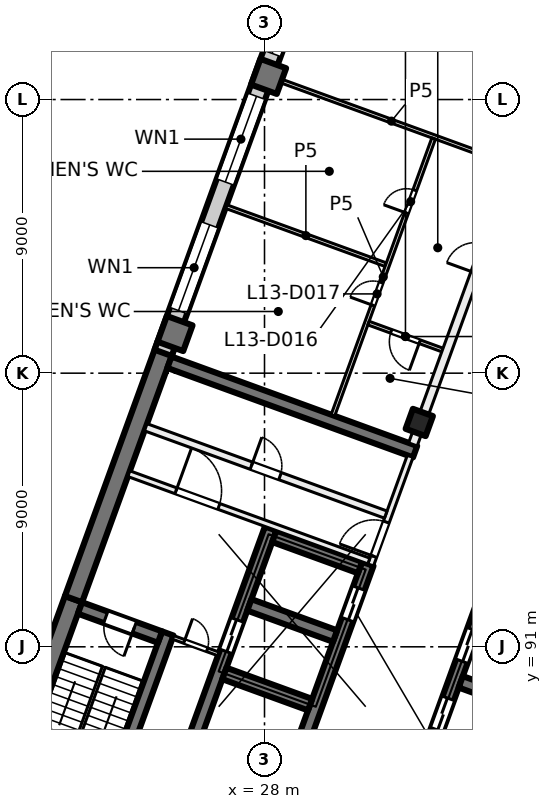
"""IFC4 building model, lengths in metres.
Left out: names, types, materials, properties, quantities, classifications, styles, units other than length and angle.
Written with IfcOpenShell. Run it as: python <this file> out.ifc"""

import sys

from ifc_helpers import new_model, si_unit, direction, frame, frame_2d, origin, origin_2d, place, context, subcontext, project, spatial, rectangle, extrude, element, fill, save


model = new_model("IFC4")
c1 = context("Model", 3, precision=1e-05, world=origin(), true_north=direction((0.0, 1.0)))
c2 = subcontext(c1, "Body", "Model", "MODEL_VIEW")
j1 = project(units=[si_unit("LENGTHUNIT", "METRE"), si_unit("PLANEANGLEUNIT", "RADIAN")], contexts=[c1])
p1 = place(None, origin())
s1 = spatial("IfcSite", under=j1, at=p1, CompositionType="ELEMENT")
p2 = place(p1, origin())
s2 = spatial("IfcBuilding", under=s1, at=p2, CompositionType="ELEMENT")
p3 = place(p2, frame((0.0, 0.0, 59.5)))
s3 = spatial("IfcBuildingStorey", under=s2, at=p3, CompositionType="ELEMENT", Elevation=59.5)
p4 = place(p3, frame((33.091, 98.379, 0.0), z_axis=(0.0, 0.0, 1.0), x_axis=(-0.342020143326, -0.939692620786, 0.0)))
e1 = element("IfcColumn", 1, at=p4, inside=s3, PredefinedType="COLUMN", context=c2, shape_type="SweptSolid", body=[
    extrude(rectangle(XDim=0.7, YDim=0.7, at=origin_2d()), origin(), (0.0, 0.0, 1.0), 4.0),
])
for number, where, z_axis, x_axis in (
    (2, (28.134, 109.76, 0.0), (0.0, 0.0, 1.0), (-0.342, -0.94, 0.0)),
    (3, (25.056, 101.303, 0.0), (0.0, 0.0, 1.0), (-0.342, -0.94, 0.0)),
):
    element("IfcColumn", number, at=place(p3, frame(where, z_axis=z_axis, x_axis=x_axis)), inside=s3, PredefinedType="COLUMN", context=c2, shape_type="SweptSolid", body=[
        extrude(rectangle(XDim=0.9, YDim=0.9, at=origin_2d()), origin(), (0.0, 0.0, 1.0), 4.0),
    ])
p5 = place(p3, frame((19.05, 85.239, 0.0), z_axis=(0.0, 0.0, 1.0), x_axis=(0.342016982193, 0.939693771338, 0.0)))
e4 = element("IfcWall", 4, at=p5, inside=s3, PredefinedType="SHEAR", context=c2, shape_type="SweptSolid", body=[
    extrude(rectangle(XDim=7.8, YDim=0.6, at=frame_2d((3.9, 0.0))), origin(), (0.0, 0.0, 1.0), 4.0),
])
p6 = place(p3, frame((21.717, 92.568, 0.0), z_axis=(0.0, 0.0, 1.0), x_axis=(0.342016162452, 0.939694069696, 0.0)))
e5 = element("IfcWall", 5, at=p6, inside=s3, PredefinedType="SHEAR", context=c2, shape_type="SweptSolid", body=[
    extrude(rectangle(XDim=8.9, YDim=0.6, at=frame_2d((4.45, 0.0))), origin(), (0.0, 0.0, 1.0), 4.0),
])
p7 = place(p3, frame((22.15, 84.11, 0.0), z_axis=(0.0, 0.0, 1.0), x_axis=(0.342016982193, 0.939693771338, 0.0)))
e6 = element("IfcWall", 6, at=p7, inside=s3, PredefinedType="SHEAR", context=c2, shape_type="SweptSolid", body=[
    extrude(rectangle(XDim=7.8, YDim=0.4, at=frame_2d((3.9, 0.0))), origin(), (0.0, 0.0, 1.0), 4.0),
])
p8 = place(p3, frame((24.562, 91.32, 0.0), z_axis=(0.0, 0.0, 1.0), x_axis=(-0.939717030584, 0.341953070509, 0.0)))
e7 = element("IfcWall", 7, at=p8, inside=s3, PredefinedType="SHEAR", context=c2, shape_type="SweptSolid", body=[
    extrude(rectangle(XDim=2.8, YDim=0.4, at=frame_2d((1.4, 0.0))), origin(), (0.0, 0.0, 1.0), 4.0),
])
p9 = place(p8, frame((0.9, 0.0, 0.0)))
e8 = element("IfcOpeningElement", 8, at=p9, cuts=e7, PredefinedType="OPENING", context=c2, shape_type="SweptSolid", body=[
    extrude(rectangle(XDim=1.0, YDim=2.1, at=frame_2d((0.5, 1.05))), frame((0.0, 0.21, 0.0), z_axis=(0.0, -1.0, 0.0), x_axis=(1.0, 0.0, 0.0)), (0.0, 0.0, 1.0), 0.42),
])
p10 = place(p3, frame((30.984, 80.895, 0.0), z_axis=(0.0, 0.0, 1.0), x_axis=(0.342021021735, 0.939692301071, 0.0)))
e9 = element("IfcWall", 9, at=p10, inside=s3, PredefinedType="SHEAR", context=c2, shape_type="SweptSolid", body=[
    extrude(rectangle(XDim=12.2, YDim=0.4, at=frame_2d((6.1, 0.0))), origin(), (0.0, 0.0, 1.0), 4.0),
])
p11 = place(p10, frame((5.45, 0.0, 0.0)))
e10 = element("IfcOpeningElement", 10, at=p11, cuts=e9, PredefinedType="OPENING", context=c2, shape_type="SweptSolid", body=[
    extrude(rectangle(XDim=1.1, YDim=2.1, at=frame_2d((0.55, 1.05))), frame((0.0, 0.21, 0.0), z_axis=(0.0, -1.0, 0.0), x_axis=(1.0, 0.0, 0.0)), (0.0, 0.0, 1.0), 0.42),
])
p12 = place(p10, frame((7.85, 0.0, 0.0)))
e11 = element("IfcOpeningElement", 11, at=p12, cuts=e9, PredefinedType="OPENING", context=c2, shape_type="SweptSolid", body=[
    extrude(rectangle(XDim=1.1, YDim=2.1, at=frame_2d((0.55, 1.05))), frame((0.0, 0.21, 0.0), z_axis=(0.0, -1.0, 0.0), x_axis=(1.0, 0.0, 0.0)), (0.0, 0.0, 1.0), 0.42),
])
p13 = place(p10, frame((10.25, 0.0, 0.0)))
e12 = element("IfcOpeningElement", 12, at=p13, cuts=e9, PredefinedType="OPENING", context=c2, shape_type="SweptSolid", body=[
    extrude(rectangle(XDim=1.1, YDim=2.1, at=frame_2d((0.55, 1.05))), frame((0.0, 0.21, 0.0), z_axis=(0.0, -1.0, 0.0), x_axis=(1.0, 0.0, 0.0)), (0.0, 0.0, 1.0), 0.42),
])
p14 = place(p3, frame((34.178, 79.732, 0.0), z_axis=(0.0, 0.0, 1.0), x_axis=(0.342014590177, 0.939694641948, 0.0)))
e13 = element("IfcWall", 13, at=p14, inside=s3, PredefinedType="SHEAR", context=c2, shape_type="SweptSolid", body=[
    extrude(rectangle(XDim=12.2, YDim=0.4, at=frame_2d((6.1, 0.0))), origin(), (0.0, 0.0, 1.0), 4.0),
])
p15 = place(p3, frame((37.274, 88.822, 0.0), z_axis=(0.0, 0.0, 1.0), x_axis=(-0.939686455819, 0.342037080957, 0.0)))
e14 = element("IfcWall", 14, at=p15, inside=s3, PredefinedType="SHEAR", context=c2, shape_type="SweptSolid", body=[
    extrude(rectangle(XDim=3.0, YDim=0.4, at=frame_2d((1.5, 0.0))), origin(), (0.0, 0.0, 1.0), 4.0),
])
p16 = place(p3, frame((27.225, 82.263, 0.0), z_axis=(0.0, 0.0, 1.0), x_axis=(0.342014590177, 0.939694641948, 0.0)))
e15 = element("IfcWall", 15, at=p16, inside=s3, PredefinedType="SHEAR", context=c2, shape_type="SweptSolid", body=[
    extrude(rectangle(XDim=12.2, YDim=0.4, at=frame_2d((6.1, 0.0))), origin(), (0.0, 0.0, 1.0), 4.0),
])
p17 = place(p16, frame((10.25, 0.0, 0.0)))
e16 = element("IfcOpeningElement", 16, at=p17, cuts=e15, PredefinedType="OPENING", context=c2, shape_type="SweptSolid", body=[
    extrude(rectangle(XDim=1.1, YDim=2.1, at=frame_2d((0.55, 1.05))), frame((0.0, 0.21, 0.0), z_axis=(0.0, -1.0, 0.0), x_axis=(1.0, 0.0, 0.0)), (0.0, 0.0, 1.0), 0.42),
])
p18 = place(p16, frame((0.7, 0.0, 0.0)))
e17 = element("IfcOpeningElement", 17, at=p18, cuts=e15, PredefinedType="OPENING", context=c2, shape_type="SweptSolid", body=[
    extrude(rectangle(XDim=0.8, YDim=2.1, at=frame_2d((0.4, 1.05))), frame((0.0, 0.21, 0.0), z_axis=(0.0, -1.0, 0.0), x_axis=(1.0, 0.0, 0.0)), (0.0, 0.0, 1.0), 0.42),
])
p19 = place(p3, frame((24.03, 83.426, 0.0), z_axis=(0.0, 0.0, 1.0), x_axis=(0.342014590177, 0.939694641948, 0.0)))
e18 = element("IfcWall", 18, at=p19, inside=s3, PredefinedType="SHEAR", context=c2, shape_type="SweptSolid", body=[
    extrude(rectangle(XDim=12.2, YDim=0.4, at=frame_2d((6.1, 0.0))), origin(), (0.0, 0.0, 1.0), 4.0),
])
p20 = place(p19, frame((7.9, 0.0, 0.0)))
e19 = element("IfcOpeningElement", 19, at=p20, cuts=e18, PredefinedType="OPENING", context=c2, shape_type="SweptSolid", body=[
    extrude(rectangle(XDim=1.1, YDim=2.1, at=frame_2d((0.55, 1.05))), frame((0.0, 0.21, 0.0), z_axis=(0.0, -1.0, 0.0), x_axis=(1.0, 0.0, 0.0)), (0.0, 0.0, 1.0), 0.42),
])
for number, where, z_axis, x_axis in (
    (20, (29.5, 89.097, 0.0), (0.0, 0.0, 1.0), (-0.94, 0.342, 0.0)),
    (21, (30.32, 91.353, 0.0), (0.0, 0.0, 1.0), (-0.94, 0.342, 0.0)),
    (22, (31.141, 93.608, 0.0), (0.0, 0.0, 1.0), (-0.94, 0.342, 0.0)),
):
    element("IfcWall", number, at=place(p3, frame(where, z_axis=z_axis, x_axis=x_axis)), inside=s3, PredefinedType="SHEAR", context=c2, shape_type="SweptSolid", body=[
        extrude(rectangle(XDim=3.0, YDim=0.4, at=frame_2d((1.5, 0.0))), origin(), (0.0, 0.0, 1.0), 4.0),
    ])
p21 = place(p3, frame((32.953, 97.418, 0.0), z_axis=(0.0, 0.0, 1.0), x_axis=(-0.93969060187, 0.342025690201, 0.0)))
e23 = element("IfcWall", 23, at=p21, inside=s3, PredefinedType="SHEAR", context=c2, shape_type="SweptSolid", body=[
    extrude(rectangle(XDim=8.6, YDim=0.4, at=frame_2d((4.3, 0.0))), origin(), (0.0, 0.0, 1.0), 4.0),
])
p22 = place(p3, frame((24.666, 100.669, 0.0), z_axis=(0.0, 0.0, 1.0), x_axis=(0.34201964167, 0.939692803373, 0.0)))
e24 = element("IfcWall", 24, at=p22, inside=s3, PredefinedType="SOLIDWALL", context=c2, shape_type="SweptSolid", body=[
    extrude(rectangle(XDim=32.884, YDim=0.6, at=frame_2d((16.442, 0.0))), origin(), (0.0, 0.0, 1.0), 3.625),
])
p23 = place(p22, frame((1.48, 0.0, 0.9)))
e25 = element("IfcOpeningElement", 25, at=p23, cuts=e24, PredefinedType="OPENING", context=c2, shape_type="SweptSolid", body=[
    extrude(rectangle(XDim=3.0, YDim=2.4, at=frame_2d((1.5, 1.2))), frame((0.0, 0.31, 0.0), z_axis=(0.0, -1.0, 0.0), x_axis=(1.0, 0.0, 0.0)), (0.0, 0.0, 1.0), 0.62),
])
p24 = place(p22, frame((5.98, 0.0, 0.9)))
e26 = element("IfcOpeningElement", 26, at=p24, cuts=e24, PredefinedType="OPENING", context=c2, shape_type="SweptSolid", body=[
    extrude(rectangle(XDim=3.0, YDim=2.4, at=frame_2d((1.5, 1.2))), frame((0.0, 0.31, 0.0), z_axis=(0.0, -1.0, 0.0), x_axis=(1.0, 0.0, 0.0)), (0.0, 0.0, 1.0), 0.62),
])
p25 = place(p22, frame((10.48, 0.0, 0.9)))
e27 = element("IfcOpeningElement", 27, at=p25, cuts=e24, PredefinedType="OPENING", context=c2, shape_type="SweptSolid", body=[
    extrude(rectangle(XDim=3.0, YDim=2.4, at=frame_2d((1.5, 1.2))), frame((0.0, 0.31, 0.0), z_axis=(0.0, -1.0, 0.0), x_axis=(1.0, 0.0, 0.0)), (0.0, 0.0, 1.0), 0.62),
])
p26 = place(p22, frame((14.98, 0.0, 0.9)))
e28 = element("IfcOpeningElement", 28, at=p26, cuts=e24, PredefinedType="OPENING", context=c2, shape_type="SweptSolid", body=[
    extrude(rectangle(XDim=3.0, YDim=2.4, at=frame_2d((1.5, 1.2))), frame((0.0, 0.31, 0.0), z_axis=(0.0, -1.0, 0.0), x_axis=(1.0, 0.0, 0.0)), (0.0, 0.0, 1.0), 0.62),
])
p27 = place(p22, frame((19.48, 0.0, 0.9)))
e29 = element("IfcOpeningElement", 29, at=p27, cuts=e24, PredefinedType="OPENING", context=c2, shape_type="SweptSolid", body=[
    extrude(rectangle(XDim=3.0, YDim=2.4, at=frame_2d((1.5, 1.2))), frame((0.0, 0.31, 0.0), z_axis=(0.0, -1.0, 0.0), x_axis=(1.0, 0.0, 0.0)), (0.0, 0.0, 1.0), 0.62),
])
p28 = place(p22, frame((23.98, 0.0, 0.9)))
e30 = element("IfcOpeningElement", 30, at=p28, cuts=e24, PredefinedType="OPENING", context=c2, shape_type="SweptSolid", body=[
    extrude(rectangle(XDim=3.0, YDim=2.4, at=frame_2d((1.5, 1.2))), frame((0.0, 0.31, 0.0), z_axis=(0.0, -1.0, 0.0), x_axis=(1.0, 0.0, 0.0)), (0.0, 0.0, 1.0), 0.62),
])
p29 = place(p22, frame((28.48, 0.0, 0.9)))
e31 = element("IfcOpeningElement", 31, at=p29, cuts=e24, PredefinedType="OPENING", context=c2, shape_type="SweptSolid", body=[
    extrude(rectangle(XDim=3.0, YDim=2.4, at=frame_2d((1.5, 1.2))), frame((0.0, 0.31, 0.0), z_axis=(0.0, -1.0, 0.0), x_axis=(1.0, 0.0, 0.0)), (0.0, 0.0, 1.0), 0.62),
])
p30 = place(p3, frame((31.491, 93.693, 0.0), z_axis=(0.0, 0.0, 1.0), x_axis=(0.341995824804, 0.939701471648, 0.0)))
e32 = element("IfcWall", 32, at=p30, inside=s3, PredefinedType="PARTITIONING", context=c2, shape_type="SweptSolid", body=[
    extrude(rectangle(XDim=3.8, YDim=0.2, at=frame_2d((1.9, 0.0))), origin(), (0.0, 0.0, 1.0), 3.625),
])
p31 = place(p30, frame((0.3, 0.0, 0.0)))
e33 = element("IfcOpeningElement", 33, at=p31, cuts=e32, PredefinedType="OPENING", context=c2, shape_type="SweptSolid", body=[
    extrude(rectangle(XDim=1.2, YDim=2.1, at=frame_2d((0.6, 1.05))), frame((0.0, 0.11, 0.0), z_axis=(0.0, -1.0, 0.0), x_axis=(1.0, 0.0, 0.0)), (0.0, 0.0, 1.0), 0.22),
])
p32 = place(p3, frame((23.538, 96.694, 0.0), z_axis=(0.0, 0.0, 1.0), x_axis=(0.939691552312, -0.342023078919, 0.0)))
e34 = element("IfcWall", 34, at=p32, inside=s3, PredefinedType="PARTITIONING", context=c2, shape_type="SweptSolid", body=[
    extrude(rectangle(XDim=8.4, YDim=0.2, at=frame_2d((4.2, 0.0))), origin(), (0.0, 0.0, 1.0), 3.625),
])
p33 = place(p32, frame((1.65, 0.0, 0.0)))
e35 = element("IfcOpeningElement", 35, at=p33, cuts=e34, PredefinedType="OPENING", context=c2, shape_type="SweptSolid", body=[
    extrude(rectangle(XDim=1.5, YDim=2.1, at=frame_2d((0.75, 1.05))), frame((0.0, 0.11, 0.0), z_axis=(0.0, -1.0, 0.0), x_axis=(1.0, 0.0, 0.0)), (0.0, 0.0, 1.0), 0.22),
])
p34 = place(p3, frame((24.094, 98.221, 0.0), z_axis=(0.0, 0.0, 1.0), x_axis=(0.939691552312, -0.342023078919, 0.0)))
e36 = element("IfcWall", 36, at=p34, inside=s3, PredefinedType="PARTITIONING", context=c2, shape_type="SweptSolid", body=[
    extrude(rectangle(XDim=8.4, YDim=0.25, at=frame_2d((4.2, 0.0))), origin(), (0.0, 0.0, 1.0), 3.625),
])
p35 = place(p34, frame((3.7, 0.0, 0.0)))
e37 = element("IfcOpeningElement", 37, at=p35, cuts=e36, PredefinedType="OPENING", context=c2, shape_type="SweptSolid", body=[
    extrude(rectangle(XDim=1.0, YDim=2.1, at=frame_2d((0.5, 1.05))), frame((0.0, 0.135, 0.0), z_axis=(0.0, -1.0, 0.0), x_axis=(1.0, 0.0, 0.0)), (0.0, 0.0, 1.0), 0.27),
])
p36 = place(p3, frame((24.985, 91.312, 0.0), z_axis=(0.0, 0.0, 1.0), x_axis=(0.939708740826, -0.341975850632, 0.0)))
e38 = element("IfcWall", 38, at=p36, inside=s3, PredefinedType="PARTITIONING", context=c2, shape_type="SweptSolid", body=[
    extrude(rectangle(XDim=1.6, YDim=0.125, at=frame_2d((0.8, 0.0))), origin(), (0.0, 0.0, 1.0), 3.625),
])
p37 = place(p36, frame((0.4, 0.0, 0.0)))
e39 = element("IfcOpeningElement", 39, at=p37, cuts=e38, PredefinedType="OPENING", context=c2, shape_type="SweptSolid", body=[
    extrude(rectangle(XDim=0.8, YDim=2.1, at=frame_2d((0.4, 1.05))), frame((0.0, 0.073, 0.0), z_axis=(0.0, -1.0, 0.0), x_axis=(1.0, 0.0, 0.0)), (0.0, 0.0, 1.0), 0.145),
])
p38 = place(p3, frame((26.736, 105.48, 0.0), z_axis=(0.0, 0.0, 1.0), x_axis=(0.939690035435, -0.342027246436, 0.0)))
e40 = element("IfcWall", 40, at=p38, inside=s3, PredefinedType="PARTITIONING", context=c2, shape_type="SweptSolid", body=[
    extrude(rectangle(XDim=5.587, YDim=0.125, at=frame_2d((2.793, 0.0))), origin(), (0.0, 0.0, 1.0), 3.625),
])
p39 = place(p3, frame((28.275, 109.709, 0.0), z_axis=(0.0, 0.0, 1.0), x_axis=(0.939697205528, -0.342007546586, 0.0)))
e41 = element("IfcWall", 41, at=p39, inside=s3, PredefinedType="PARTITIONING", context=c2, shape_type="SweptSolid", body=[
    extrude(rectangle(XDim=8.301, YDim=0.125, at=frame_2d((4.15, 0.0))), origin(), (0.0, 0.0, 1.0), 3.625),
])
p40 = place(p3, frame((30.25, 98.615, 0.0), z_axis=(0.0, 0.0, 1.0), x_axis=(0.341998018937, 0.93970067311, 0.0)))
e42 = element("IfcWall", 42, at=p40, inside=s3, PredefinedType="PARTITIONING", context=c2, shape_type="SweptSolid", body=[
    extrude(rectangle(XDim=9.687, YDim=0.125, at=frame_2d((4.844, 0.0))), origin(), (0.0, 0.0, 1.0), 3.625),
])
p41 = place(p40, frame((7.078, 0.0, 0.0)))
e43 = element("IfcOpeningElement", 43, at=p41, cuts=e42, PredefinedType="OPENING", context=c2, shape_type="SweptSolid", body=[
    extrude(rectangle(XDim=0.8, YDim=2.1, at=frame_2d((0.4, 1.05))), frame((0.0, 0.073, 0.0), z_axis=(0.0, -1.0, 0.0), x_axis=(1.0, 0.0, 0.0)), (0.0, 0.0, 1.0), 0.145),
])
p42 = place(p40, frame((3.848, 0.0, 0.0)))
e44 = element("IfcOpeningElement", 44, at=p42, cuts=e42, PredefinedType="OPENING", context=c2, shape_type="SweptSolid", body=[
    extrude(rectangle(XDim=0.8, YDim=2.1, at=frame_2d((0.4, 1.05))), frame((0.0, 0.073, 0.0), z_axis=(0.0, -1.0, 0.0), x_axis=(1.0, 0.0, 0.0)), (0.0, 0.0, 1.0), 0.145),
])
p43 = place(p3, frame((33.852, 100.762, 0.0), z_axis=(0.0, 0.0, 1.0), x_axis=(-0.93959774877, 0.342280689649, 0.0)))
e45 = element("IfcWall", 45, at=p43, inside=s3, PredefinedType="PARTITIONING", context=c2, shape_type="SweptSolid", body=[
    extrude(rectangle(XDim=2.588, YDim=0.125, at=frame_2d((1.294, 0.0))), origin(), (0.0, 0.0, 1.0), 3.625),
])
p44 = place(p43, frame((0.794, 0.0, 0.0)))
e46 = element("IfcOpeningElement", 46, at=p44, cuts=e45, PredefinedType="OPENING", context=c2, shape_type="SweptSolid", body=[
    extrude(rectangle(XDim=1.0, YDim=2.1, at=frame_2d((0.5, 1.05))), frame((0.0, 0.073, 0.0), z_axis=(0.0, -1.0, 0.0), x_axis=(1.0, 0.0, 0.0)), (0.0, 0.0, 1.0), 0.145),
])
p45 = place(p3, frame((32.881, 97.657, 0.0), z_axis=(0.0, 0.0, 1.0), x_axis=(0.342017360004, 0.939693633828, 0.0)))
e47 = element("IfcWall", 47, at=p45, inside=s3, PredefinedType="PARTITIONING", context=c2, shape_type="SweptSolid", body=[
    extrude(rectangle(XDim=34.516, YDim=0.3, at=frame_2d((17.258, 0.0))), origin(), (0.0, 0.0, 1.0), 3.625),
])
p46 = place(p45, frame((6.0, 0.0, 0.0)))
e48 = element("IfcOpeningElement", 48, at=p46, cuts=e47, PredefinedType="OPENING", context=c2, shape_type="SweptSolid", body=[
    extrude(rectangle(XDim=1.0, YDim=2.1, at=frame_2d((0.5, 1.05))), frame((0.0, 0.16, 0.0), z_axis=(0.0, -1.0, 0.0), x_axis=(1.0, 0.0, 0.0)), (0.0, 0.0, 1.0), 0.32),
])
p47 = place(p45, frame((19.85, 0.0, 0.0)))
e49 = element("IfcOpeningElement", 49, at=p47, cuts=e47, PredefinedType="OPENING", context=c2, shape_type="SweptSolid", body=[
    extrude(rectangle(XDim=1.8, YDim=2.1, at=frame_2d((0.9, 1.05))), frame((0.0, 0.16, 0.0), z_axis=(0.0, -1.0, 0.0), x_axis=(1.0, 0.0, 0.0)), (0.0, 0.0, 1.0), 0.32),
])
p48 = place(p23, origin())
e50 = element("IfcWindow", 50, at=p48, inside=s3, PartitioningType="SINGLE_PANEL", PredefinedType="WINDOW", context=c2, shape_type="SweptSolid", body=[
    extrude(rectangle(XDim=3.0, YDim=2.4, at=frame_2d((1.5, 1.2))), frame((0.0, 0.03, 0.0), z_axis=(0.0, -1.0, 0.0), x_axis=(1.0, 0.0, 0.0)), (0.0, 0.0, 1.0), 0.06),
])
fill(e25, e50)
p49 = place(p24, origin())
e51 = element("IfcWindow", 51, at=p49, inside=s3, PartitioningType="SINGLE_PANEL", PredefinedType="WINDOW", context=c2, shape_type="SweptSolid", body=[
    extrude(rectangle(XDim=3.0, YDim=2.4, at=frame_2d((1.5, 1.2))), frame((0.0, 0.03, 0.0), z_axis=(0.0, -1.0, 0.0), x_axis=(1.0, 0.0, 0.0)), (0.0, 0.0, 1.0), 0.06),
])
fill(e26, e51)
p50 = place(p25, origin())
e52 = element("IfcWindow", 52, at=p50, inside=s3, PartitioningType="SINGLE_PANEL", PredefinedType="WINDOW", context=c2, shape_type="SweptSolid", body=[
    extrude(rectangle(XDim=3.0, YDim=2.4, at=frame_2d((1.5, 1.2))), frame((0.0, 0.03, 0.0), z_axis=(0.0, -1.0, 0.0), x_axis=(1.0, 0.0, 0.0)), (0.0, 0.0, 1.0), 0.06),
])
fill(e27, e52)
p51 = place(p17, origin())
e53 = element("IfcDoor", 53, at=p51, inside=s3, OperationType="DOUBLE_DOOR_SLIDING", PredefinedType="DOOR", context=c2, shape_type="SweptSolid", body=[
    extrude(rectangle(XDim=1.1, YDim=2.1, at=frame_2d((0.55, 1.05))), frame((0.0, 0.025, 0.0), z_axis=(0.0, -1.0, 0.0), x_axis=(1.0, 0.0, 0.0)), (0.0, 0.0, 1.0), 0.05),
])
fill(e16, e53)
p52 = place(p12, origin())
e54 = element("IfcDoor", 54, at=p52, inside=s3, OperationType="DOUBLE_DOOR_SLIDING", PredefinedType="DOOR", context=c2, shape_type="SweptSolid", body=[
    extrude(rectangle(XDim=1.1, YDim=2.1, at=frame_2d((0.55, 1.05))), frame((0.0, 0.025, 0.0), z_axis=(0.0, -1.0, 0.0), x_axis=(1.0, 0.0, 0.0)), (0.0, 0.0, 1.0), 0.05),
])
fill(e11, e54)
p53 = place(p13, origin())
e55 = element("IfcDoor", 55, at=p53, inside=s3, OperationType="DOUBLE_DOOR_SLIDING", PredefinedType="DOOR", context=c2, shape_type="SweptSolid", body=[
    extrude(rectangle(XDim=1.1, YDim=2.1, at=frame_2d((0.55, 1.05))), frame((0.0, 0.025, 0.0), z_axis=(0.0, -1.0, 0.0), x_axis=(1.0, 0.0, 0.0)), (0.0, 0.0, 1.0), 0.05),
])
fill(e12, e55)
p54 = place(p31, origin())
e56 = element("IfcDoor", 56, at=p54, inside=s3, OperationType="DOUBLE_DOOR_SINGLE_SWING", PredefinedType="DOOR", context=c2, shape_type="SweptSolid", body=[
    extrude(rectangle(XDim=1.2, YDim=2.1, at=frame_2d((0.6, 1.05))), frame((0.0, 0.025, 0.0), z_axis=(0.0, -1.0, 0.0), x_axis=(1.0, 0.0, 0.0)), (0.0, 0.0, 1.0), 0.05),
])
fill(e33, e56)
p55 = place(p33, origin())
e57 = element("IfcDoor", 57, at=p55, inside=s3, OperationType="DOUBLE_DOOR_SINGLE_SWING", PredefinedType="DOOR", context=c2, shape_type="SweptSolid", body=[
    extrude(rectangle(XDim=1.5, YDim=2.1, at=frame_2d((0.75, 1.05))), frame((0.0, 0.025, 0.0), z_axis=(0.0, -1.0, 0.0), x_axis=(1.0, 0.0, 0.0)), (0.0, 0.0, 1.0), 0.05),
])
fill(e35, e57)
p56 = place(p9, origin())
e58 = element("IfcDoor", 58, at=p56, inside=s3, OperationType="SINGLE_SWING_LEFT", PredefinedType="DOOR", context=c2, shape_type="SweptSolid", body=[
    extrude(rectangle(XDim=1.0, YDim=2.1, at=frame_2d((0.5, 1.05))), frame((0.0, 0.025, 0.0), z_axis=(0.0, -1.0, 0.0), x_axis=(1.0, 0.0, 0.0)), (0.0, 0.0, 1.0), 0.05),
])
fill(e8, e58)
p57 = place(p37, origin())
e59 = element("IfcDoor", 59, at=p57, inside=s3, OperationType="SINGLE_SWING_RIGHT", PredefinedType="DOOR", context=c2, shape_type="SweptSolid", body=[
    extrude(rectangle(XDim=0.8, YDim=2.1, at=frame_2d((0.4, 1.05))), frame((0.0, 0.025, 0.0), z_axis=(0.0, -1.0, 0.0), x_axis=(1.0, 0.0, 0.0)), (0.0, 0.0, 1.0), 0.05),
])
fill(e39, e59)
p58 = place(p35, origin())
e60 = element("IfcDoor", 60, at=p58, inside=s3, OperationType="SINGLE_SWING_LEFT", PredefinedType="DOOR", context=c2, shape_type="SweptSolid", body=[
    extrude(rectangle(XDim=1.0, YDim=2.1, at=frame_2d((0.5, 1.05))), frame((0.0, 0.025, 0.0), z_axis=(0.0, -1.0, 0.0), x_axis=(1.0, 0.0, 0.0)), (0.0, 0.0, 1.0), 0.05),
])
fill(e37, e60)
p59 = place(p20, origin())
e61 = element("IfcDoor", 61, at=p59, inside=s3, OperationType="DOUBLE_DOOR_SLIDING", PredefinedType="DOOR", context=c2, shape_type="SweptSolid", body=[
    extrude(rectangle(XDim=1.1, YDim=2.1, at=frame_2d((0.55, 1.05))), frame((0.0, 0.025, 0.0), z_axis=(0.0, -1.0, 0.0), x_axis=(1.0, 0.0, 0.0)), (0.0, 0.0, 1.0), 0.05),
])
fill(e19, e61)
p60 = place(p44, origin())
e62 = element("IfcDoor", 62, at=p60, inside=s3, OperationType="SINGLE_SWING_RIGHT", PredefinedType="DOOR", context=c2, shape_type="SweptSolid", body=[
    extrude(rectangle(XDim=1.0, YDim=2.1, at=frame_2d((0.5, 1.05))), frame((0.0, 0.025, 0.0), z_axis=(0.0, -1.0, 0.0), x_axis=(1.0, 0.0, 0.0)), (0.0, 0.0, 1.0), 0.05),
])
fill(e46, e62)
p61 = place(p41, origin())
e63 = element("IfcDoor", 63, at=p61, inside=s3, OperationType="SINGLE_SWING_RIGHT", PredefinedType="DOOR", context=c2, shape_type="SweptSolid", body=[
    extrude(rectangle(XDim=0.8, YDim=2.1, at=frame_2d((0.4, 1.05))), frame((0.0, 0.025, 0.0), z_axis=(0.0, -1.0, 0.0), x_axis=(1.0, 0.0, 0.0)), (0.0, 0.0, 1.0), 0.05),
])
fill(e43, e63)
p62 = place(p42, origin())
e64 = element("IfcDoor", 64, at=p62, inside=s3, OperationType="SINGLE_SWING_RIGHT", PredefinedType="DOOR", context=c2, shape_type="SweptSolid", body=[
    extrude(rectangle(XDim=0.8, YDim=2.1, at=frame_2d((0.4, 1.05))), frame((0.0, 0.025, 0.0), z_axis=(0.0, -1.0, 0.0), x_axis=(1.0, 0.0, 0.0)), (0.0, 0.0, 1.0), 0.05),
])
fill(e44, e64)
save(model, sys.argv[1])
